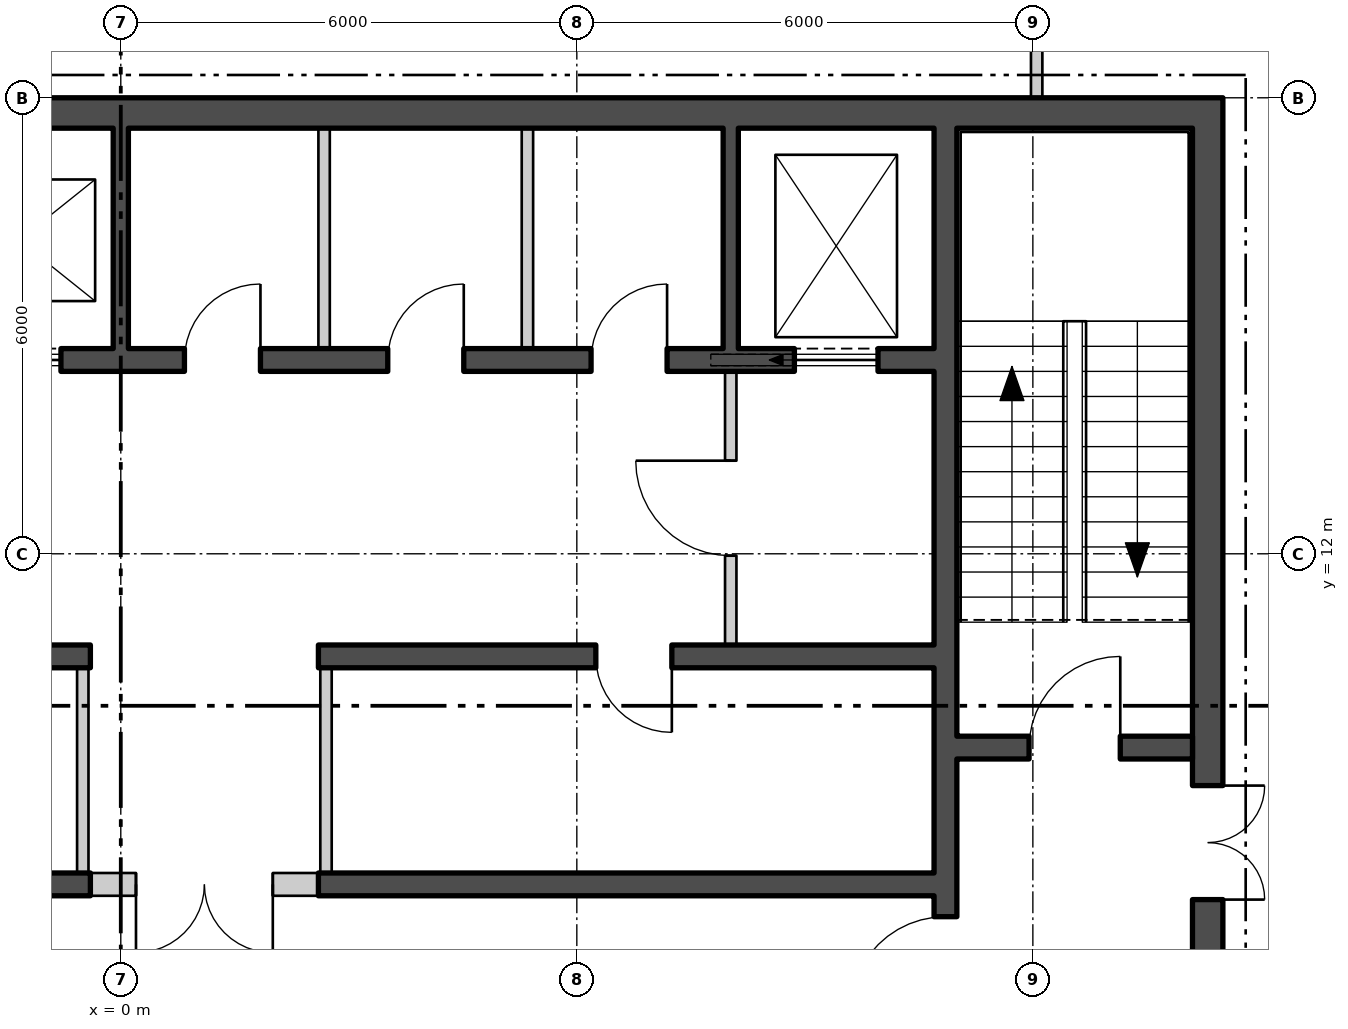
"""IFC4 building model, lengths in metres.
Left out: names, types, materials, properties, quantities, classifications, styles, units other than length and angle.
Written with IfcOpenShell. Run it as: python <this file> out.ifc"""

import sys

from ifc_helpers import new_model, si_unit, direction, frame, frame_2d, origin, place, context, subcontext, project, spatial, polyline, rectangle, outline, extrude, element, fill, save


model = new_model("IFC4")
c1 = context("Model", 3, precision=1e-05, world=origin(), true_north=direction((0.0, 1.0)))
c2 = subcontext(c1, "Body", "Model", "MODEL_VIEW")
j1 = project(units=[si_unit("LENGTHUNIT", "METRE"), si_unit("PLANEANGLEUNIT", "RADIAN")], contexts=[c1])
p1 = place(None, origin())
s1 = spatial("IfcSite", under=j1, at=p1, CompositionType="ELEMENT")
p2 = place(p1, origin())
s2 = spatial("IfcBuilding", under=s1, at=p2, CompositionType="ELEMENT")
p3 = place(p2, frame((0.0, 0.0, 280.5)))
s3 = spatial("IfcBuildingStorey", under=s2, at=p3, CompositionType="ELEMENT", Elevation=280.5)
p4 = place(p3, frame((2.515, -23.993, -0.18), z_axis=(0.0, 0.0, 1.0), x_axis=(0.500000711659, 0.866024992908, 0.0)))
e1 = element("IfcWall", 1, at=p4, inside=s3, PredefinedType="SOLIDWALL", context=c2, shape_type="SweptSolid", body=[
    extrude(outline(polyline([(-0.13, -0.225), (45.87, -0.225), (45.61, 0.225), (0.13, 0.225), (-0.13, -0.225)])), origin(), (0.0, 0.0, 1.0), 3.68),
])
p5 = place(p4, frame((1.424, 0.0, 1.08)))
e2 = element("IfcOpeningElement", 2, at=p5, cuts=e1, PredefinedType="OPENING", context=c2, shape_type="SweptSolid", body=[
    extrude(rectangle(XDim=2.4, YDim=2.0, at=frame_2d((1.2, 1.0))), frame((0.0, 0.235, 0.0), z_axis=(0.0, -1.0, 0.0), x_axis=(1.0, 0.0, 0.0)), (0.0, 0.0, 1.0), 0.47),
])
p6 = place(p4, frame((5.893, 0.0, 1.08)))
e3 = element("IfcOpeningElement", 3, at=p6, cuts=e1, PredefinedType="OPENING", context=c2, shape_type="SweptSolid", body=[
    extrude(rectangle(XDim=2.4, YDim=2.0, at=frame_2d((1.2, 1.0))), frame((0.0, 0.235, 0.0), z_axis=(0.0, -1.0, 0.0), x_axis=(1.0, 0.0, 0.0)), (0.0, 0.0, 1.0), 0.47),
])
p7 = place(p4, frame((10.401, 0.0, 1.08)))
e4 = element("IfcOpeningElement", 4, at=p7, cuts=e1, PredefinedType="OPENING", context=c2, shape_type="SweptSolid", body=[
    extrude(rectangle(XDim=2.4, YDim=2.0, at=frame_2d((1.2, 1.0))), frame((0.0, 0.235, 0.0), z_axis=(0.0, -1.0, 0.0), x_axis=(1.0, 0.0, 0.0)), (0.0, 0.0, 1.0), 0.47),
])
p8 = place(p4, frame((14.909, 0.0, 1.08)))
e5 = element("IfcOpeningElement", 5, at=p8, cuts=e1, PredefinedType="OPENING", context=c2, shape_type="SweptSolid", body=[
    extrude(rectangle(XDim=2.4, YDim=2.0, at=frame_2d((1.2, 1.0))), frame((0.0, 0.235, 0.0), z_axis=(0.0, -1.0, 0.0), x_axis=(1.0, 0.0, 0.0)), (0.0, 0.0, 1.0), 0.47),
])
p9 = place(p4, frame((19.416, 0.0, 1.08)))
e6 = element("IfcOpeningElement", 6, at=p9, cuts=e1, PredefinedType="OPENING", context=c2, shape_type="SweptSolid", body=[
    extrude(rectangle(XDim=2.4, YDim=2.0, at=frame_2d((1.2, 1.0))), frame((0.0, 0.235, 0.0), z_axis=(0.0, -1.0, 0.0), x_axis=(1.0, 0.0, 0.0)), (0.0, 0.0, 1.0), 0.47),
])
p10 = place(p4, frame((28.431, 0.0, 1.08)))
e7 = element("IfcOpeningElement", 7, at=p10, cuts=e1, PredefinedType="OPENING", context=c2, shape_type="SweptSolid", body=[
    extrude(rectangle(XDim=2.4, YDim=2.0, at=frame_2d((1.2, 1.0))), frame((0.0, 0.235, 0.0), z_axis=(0.0, -1.0, 0.0), x_axis=(1.0, 0.0, 0.0)), (0.0, 0.0, 1.0), 0.47),
])
p11 = place(p4, frame((37.447, 0.0, 1.08)))
e8 = element("IfcOpeningElement", 8, at=p11, cuts=e1, PredefinedType="OPENING", context=c2, shape_type="SweptSolid", body=[
    extrude(rectangle(XDim=2.4, YDim=2.0, at=frame_2d((1.2, 1.0))), frame((0.0, 0.235, 0.0), z_axis=(0.0, -1.0, 0.0), x_axis=(1.0, 0.0, 0.0)), (0.0, 0.0, 1.0), 0.47),
])
p12 = place(p4, frame((41.916, 0.0, 1.08)))
e9 = element("IfcOpeningElement", 9, at=p12, cuts=e1, PredefinedType="OPENING", context=c2, shape_type="SweptSolid", body=[
    extrude(rectangle(XDim=2.4, YDim=2.0, at=frame_2d((1.2, 1.0))), frame((0.0, 0.235, 0.0), z_axis=(0.0, -1.0, 0.0), x_axis=(1.0, 0.0, 0.0)), (0.0, 0.0, 1.0), 0.47),
])
p13 = place(p3, frame((-14.5, 17.8, 0.0), z_axis=(0.0, 0.0, 1.0), x_axis=(1.0, 0.0, 0.0)))
e10 = element("IfcWall", 10, at=p13, inside=s3, PredefinedType="SHEAR", context=c2, shape_type="SweptSolid", body=[
    extrude(rectangle(XDim=29.0, YDim=0.4, at=frame_2d((14.5, 0.0))), origin(), (0.0, 0.0, 1.0), 3.7),
])
p14 = place(p3, frame((14.3, 4.4, 0.0), z_axis=(0.0, 0.0, 1.0), x_axis=(0.0, 1.0, 0.0)))
e11 = element("IfcWall", 11, at=p14, inside=s3, PredefinedType="SHEAR", context=c2, shape_type="SweptSolid", body=[
    extrude(rectangle(XDim=13.2, YDim=0.4, at=frame_2d((6.6, 0.0))), origin(), (0.0, 0.0, 1.0), 3.7),
])
p15 = place(p14, frame((3.05, 0.0, 0.0)))
e12 = element("IfcOpeningElement", 12, at=p15, cuts=e11, PredefinedType="OPENING", context=c2, shape_type="SweptSolid", body=[
    extrude(rectangle(XDim=1.5, YDim=2.1, at=frame_2d((0.75, 1.05))), frame((0.0, 0.21, 0.0), z_axis=(0.0, -1.0, 0.0), x_axis=(1.0, 0.0, 0.0)), (0.0, 0.0, 1.0), 0.42),
])
p16 = place(p3, frame((10.85, 4.4, 0.0), z_axis=(0.0, 0.0, 1.0), x_axis=(0.0, 1.0, 0.0)))
e13 = element("IfcWall", 13, at=p16, inside=s3, PredefinedType="SHEAR", context=c2, shape_type="SweptSolid", body=[
    extrude(rectangle(XDim=13.2, YDim=0.3, at=frame_2d((6.6, 0.0))), origin(), (0.0, 0.0, 1.0), 3.7),
])
p17 = place(p16, frame((1.575, 0.0, 0.0)))
e14 = element("IfcOpeningElement", 14, at=p17, cuts=e13, PredefinedType="OPENING", context=c2, shape_type="SweptSolid", body=[
    extrude(rectangle(XDim=1.25, YDim=2.1, at=frame_2d((0.625, 1.05))), frame((0.0, 0.16, 0.0), z_axis=(0.0, -1.0, 0.0), x_axis=(1.0, 0.0, 0.0)), (0.0, 0.0, 1.0), 0.32),
])
p18 = place(p16, frame((0.4, 0.0, 0.0)))
e15 = element("IfcOpeningElement", 15, at=p18, cuts=e13, PredefinedType="OPENING", context=c2, shape_type="SweptSolid", body=[
    extrude(rectangle(XDim=0.9, YDim=2.1, at=frame_2d((0.45, 1.05))), frame((0.0, 0.16, 0.0), z_axis=(0.0, -1.0, 0.0), x_axis=(1.0, 0.0, 0.0)), (0.0, 0.0, 1.0), 0.32),
])
p19 = place(p3, frame((11.0, 9.45, 0.0), z_axis=(0.0, 0.0, 1.0), x_axis=(1.0, 0.0, 0.0)))
e16 = element("IfcWall", 16, at=p19, inside=s3, PredefinedType="SHEAR", context=c2, shape_type="SweptSolid", body=[
    extrude(rectangle(XDim=3.1, YDim=0.3, at=frame_2d((1.55, 0.0))), origin(), (0.0, 0.0, 1.0), 3.7),
])
p20 = place(p19, frame((0.95, 0.0, 0.0)))
e17 = element("IfcOpeningElement", 17, at=p20, cuts=e16, PredefinedType="OPENING", context=c2, shape_type="SweptSolid", body=[
    extrude(rectangle(XDim=1.2, YDim=2.1, at=frame_2d((0.6, 1.05))), frame((0.0, 0.16, 0.0), z_axis=(0.0, -1.0, 0.0), x_axis=(1.0, 0.0, 0.0)), (0.0, 0.0, 1.0), 0.32),
])
p21 = place(p3, frame((-10.7, 14.55, 0.0), z_axis=(0.0, 0.0, 1.0), x_axis=(1.0, 0.0, 0.0)))
e18 = element("IfcWall", 18, at=p21, inside=s3, PredefinedType="SHEAR", context=c2, shape_type="SweptSolid", body=[
    extrude(rectangle(XDim=21.4, YDim=0.3, at=frame_2d((10.7, 0.0))), origin(), (0.0, 0.0, 1.0), 3.7),
])
p22 = place(p21, frame((0.738, 0.0, 0.0)))
e19 = element("IfcOpeningElement", 19, at=p22, cuts=e18, PredefinedType="OPENING", context=c2, shape_type="SweptSolid", body=[
    extrude(rectangle(XDim=1.1, YDim=2.1, at=frame_2d((0.55, 1.05))), frame((0.0, 0.16, 0.0), z_axis=(0.0, -1.0, 0.0), x_axis=(1.0, 0.0, 0.0)), (0.0, 0.0, 1.0), 0.32),
])
p23 = place(p21, frame((3.462, 0.0, 0.0)))
e20 = element("IfcOpeningElement", 20, at=p23, cuts=e18, PredefinedType="OPENING", context=c2, shape_type="SweptSolid", body=[
    extrude(rectangle(XDim=1.1, YDim=2.1, at=frame_2d((0.55, 1.05))), frame((0.0, 0.16, 0.0), z_axis=(0.0, -1.0, 0.0), x_axis=(1.0, 0.0, 0.0)), (0.0, 0.0, 1.0), 0.32),
])
p24 = place(p21, frame((6.138, 0.0, 0.0)))
e21 = element("IfcOpeningElement", 21, at=p24, cuts=e18, PredefinedType="OPENING", context=c2, shape_type="SweptSolid", body=[
    extrude(rectangle(XDim=1.1, YDim=2.1, at=frame_2d((0.55, 1.05))), frame((0.0, 0.16, 0.0), z_axis=(0.0, -1.0, 0.0), x_axis=(1.0, 0.0, 0.0)), (0.0, 0.0, 1.0), 0.32),
])
p25 = place(p21, frame((8.812, 0.0, 0.0)))
e22 = element("IfcOpeningElement", 22, at=p25, cuts=e18, PredefinedType="OPENING", context=c2, shape_type="SweptSolid", body=[
    extrude(rectangle(XDim=1.1, YDim=2.1, at=frame_2d((0.55, 1.05))), frame((0.0, 0.16, 0.0), z_axis=(0.0, -1.0, 0.0), x_axis=(1.0, 0.0, 0.0)), (0.0, 0.0, 1.0), 0.32),
])
p26 = place(p21, frame((19.562, 0.0, 0.0)))
e23 = element("IfcOpeningElement", 23, at=p26, cuts=e18, PredefinedType="OPENING", context=c2, shape_type="SweptSolid", body=[
    extrude(rectangle(XDim=1.1, YDim=2.1, at=frame_2d((0.55, 1.05))), frame((0.0, 0.16, 0.0), z_axis=(0.0, -1.0, 0.0), x_axis=(1.0, 0.0, 0.0)), (0.0, 0.0, 1.0), 0.32),
])
p27 = place(p21, frame((11.537, 0.0, 0.0)))
e24 = element("IfcOpeningElement", 24, at=p27, cuts=e18, PredefinedType="OPENING", context=c2, shape_type="SweptSolid", body=[
    extrude(rectangle(XDim=1.0, YDim=2.1, at=frame_2d((0.5, 1.05))), frame((0.0, 0.16, 0.0), z_axis=(0.0, -1.0, 0.0), x_axis=(1.0, 0.0, 0.0)), (0.0, 0.0, 1.0), 0.32),
])
p28 = place(p21, frame((14.213, 0.0, 0.0)))
e25 = element("IfcOpeningElement", 25, at=p28, cuts=e18, PredefinedType="OPENING", context=c2, shape_type="SweptSolid", body=[
    extrude(rectangle(XDim=1.0, YDim=2.1, at=frame_2d((0.5, 1.05))), frame((0.0, 0.16, 0.0), z_axis=(0.0, -1.0, 0.0), x_axis=(1.0, 0.0, 0.0)), (0.0, 0.0, 1.0), 0.32),
])
p29 = place(p21, frame((16.887, 0.0, 0.0)))
e26 = element("IfcOpeningElement", 26, at=p29, cuts=e18, PredefinedType="OPENING", context=c2, shape_type="SweptSolid", body=[
    extrude(rectangle(XDim=1.0, YDim=2.1, at=frame_2d((0.5, 1.05))), frame((0.0, 0.16, 0.0), z_axis=(0.0, -1.0, 0.0), x_axis=(1.0, 0.0, 0.0)), (0.0, 0.0, 1.0), 0.32),
])
p30 = place(p3, frame((-10.7, 10.65, 0.0), z_axis=(0.0, 0.0, 1.0), x_axis=(1.0, 0.0, 0.0)))
e27 = element("IfcWall", 27, at=p30, inside=s3, PredefinedType="SHEAR", context=c2, shape_type="SweptSolid", body=[
    extrude(rectangle(XDim=10.3, YDim=0.3, at=frame_2d((5.15, 0.0))), origin(), (0.0, 0.0, 1.0), 3.7),
])
p31 = place(p30, frame((0.675, 0.0, 0.0)))
e28 = element("IfcOpeningElement", 28, at=p31, cuts=e27, PredefinedType="OPENING", context=c2, shape_type="SweptSolid", body=[
    extrude(rectangle(XDim=1.1, YDim=2.1, at=frame_2d((0.55, 1.05))), frame((0.0, 0.16, 0.0), z_axis=(0.0, -1.0, 0.0), x_axis=(1.0, 0.0, 0.0)), (0.0, 0.0, 1.0), 0.32),
])
p32 = place(p30, frame((3.275, 0.0, 0.0)))
e29 = element("IfcOpeningElement", 29, at=p32, cuts=e27, PredefinedType="OPENING", context=c2, shape_type="SweptSolid", body=[
    extrude(rectangle(XDim=1.1, YDim=2.1, at=frame_2d((0.55, 1.05))), frame((0.0, 0.16, 0.0), z_axis=(0.0, -1.0, 0.0), x_axis=(1.0, 0.0, 0.0)), (0.0, 0.0, 1.0), 0.32),
])
p33 = place(p30, frame((5.825, 0.0, 0.0)))
e30 = element("IfcOpeningElement", 30, at=p33, cuts=e27, PredefinedType="OPENING", context=c2, shape_type="SweptSolid", body=[
    extrude(rectangle(XDim=1.1, YDim=2.1, at=frame_2d((0.55, 1.05))), frame((0.0, 0.16, 0.0), z_axis=(0.0, -1.0, 0.0), x_axis=(1.0, 0.0, 0.0)), (0.0, 0.0, 1.0), 0.32),
])
p34 = place(p30, frame((8.425, 0.0, 0.0)))
e31 = element("IfcOpeningElement", 31, at=p34, cuts=e27, PredefinedType="OPENING", context=c2, shape_type="SweptSolid", body=[
    extrude(rectangle(XDim=1.0, YDim=2.1, at=frame_2d((0.5, 1.05))), frame((0.0, 0.16, 0.0), z_axis=(0.0, -1.0, 0.0), x_axis=(1.0, 0.0, 0.0)), (0.0, 0.0, 1.0), 0.32),
])
p35 = place(p3, frame((-10.7, 7.65, 0.0), z_axis=(0.0, 0.0, 1.0), x_axis=(1.0, 0.0, 0.0)))
e32 = element("IfcWall", 32, at=p35, inside=s3, PredefinedType="SHEAR", context=c2, shape_type="SweptSolid", body=[
    extrude(rectangle(XDim=10.3, YDim=0.3, at=frame_2d((5.15, 0.0))), origin(), (0.0, 0.0, 1.0), 3.7),
])
p36 = place(p3, frame((2.6, 10.65, 0.0), z_axis=(0.0, 0.0, 1.0), x_axis=(1.0, 0.0, 0.0)))
e33 = element("IfcWall", 33, at=p36, inside=s3, PredefinedType="SHEAR", context=c2, shape_type="SweptSolid", body=[
    extrude(rectangle(XDim=8.1, YDim=0.3, at=frame_2d((4.05, 0.0))), origin(), (0.0, 0.0, 1.0), 3.7),
])
p37 = place(p36, frame((3.65, 0.0, 0.0)))
e34 = element("IfcOpeningElement", 34, at=p37, cuts=e33, PredefinedType="OPENING", context=c2, shape_type="SweptSolid", body=[
    extrude(rectangle(XDim=1.0, YDim=2.1, at=frame_2d((0.5, 1.05))), frame((0.0, 0.16, 0.0), z_axis=(0.0, -1.0, 0.0), x_axis=(1.0, 0.0, 0.0)), (0.0, 0.0, 1.0), 0.32),
])
p38 = place(p3, frame((2.6, 7.65, 0.0), z_axis=(0.0, 0.0, 1.0), x_axis=(1.0, 0.0, 0.0)))
e35 = element("IfcWall", 35, at=p38, inside=s3, PredefinedType="SHEAR", context=c2, shape_type="SweptSolid", body=[
    extrude(rectangle(XDim=8.1, YDim=0.3, at=frame_2d((4.05, 0.0))), origin(), (0.0, 0.0, 1.0), 3.7),
])
p39 = place(p3, frame((0.0, 14.7, 0.0), z_axis=(0.0, 0.0, 1.0), x_axis=(0.0, 1.0, 0.0)))
e36 = element("IfcWall", 36, at=p39, inside=s3, PredefinedType="SHEAR", context=c2, shape_type="SweptSolid", body=[
    extrude(rectangle(XDim=2.9, YDim=0.2, at=frame_2d((1.45, 0.0))), origin(), (0.0, 0.0, 1.0), 3.7),
])
for number, where, z_axis, x_axis in (
    (37, (2.675, 14.7, 0.0), (0.0, 0.0, 1.0), (0.0, 1.0, 0.0)),
    (38, (5.35, 14.7, 0.0), (0.0, 0.0, 1.0), (0.0, 1.0, 0.0)),
):
    element("IfcWall", number, at=place(p3, frame(where, z_axis=z_axis, x_axis=x_axis)), inside=s3, PredefinedType="PARTITIONING", context=c2, shape_type="SweptSolid", body=[
        extrude(rectangle(XDim=2.9, YDim=0.15, at=frame_2d((1.45, 0.0))), origin(), (0.0, 0.0, 1.0), 3.7),
    ])
p40 = place(p3, frame((8.025, 14.7, 0.0), z_axis=(0.0, 0.0, 1.0), x_axis=(0.0, 1.0, 0.0)))
e39 = element("IfcWall", 39, at=p40, inside=s3, PredefinedType="SHEAR", context=c2, shape_type="SweptSolid", body=[
    extrude(rectangle(XDim=2.9, YDim=0.2, at=frame_2d((1.45, 0.0))), origin(), (0.0, 0.0, 1.0), 3.7),
])
for number, where, z_axis, x_axis in (
    (40, (-0.5, 7.8, 0.0), (0.0, 0.0, 1.0), (0.0, 1.0, 0.0)),
    (41, (2.7, 7.8, 0.0), (0.0, 0.0, 1.0), (0.0, 1.0, 0.0)),
):
    element("IfcWall", number, at=place(p3, frame(where, z_axis=z_axis, x_axis=x_axis)), inside=s3, PredefinedType="PARTITIONING", context=c2, shape_type="SweptSolid", body=[
        extrude(rectangle(XDim=2.7, YDim=0.15, at=frame_2d((1.35, 0.0))), origin(), (0.0, 0.0, 1.0), 3.7),
    ])
p41 = place(p3, frame((8.025, 10.8, 0.0), z_axis=(0.0, 0.0, 1.0), x_axis=(0.0, 1.0, 0.0)))
e42 = element("IfcWall", 42, at=p41, inside=s3, PredefinedType="PARTITIONING", context=c2, shape_type="SweptSolid", body=[
    extrude(rectangle(XDim=3.6, YDim=0.15, at=frame_2d((1.8, 0.0))), origin(), (0.0, 0.0, 1.0), 3.7),
])
p42 = place(p41, frame((1.175, 0.0, 0.0)))
e43 = element("IfcOpeningElement", 43, at=p42, cuts=e42, PredefinedType="OPENING", context=c2, shape_type="SweptSolid", body=[
    extrude(rectangle(XDim=1.25, YDim=2.1, at=frame_2d((0.625, 1.05))), frame((0.0, 0.085, 0.0), z_axis=(0.0, -1.0, 0.0), x_axis=(1.0, 0.0, 0.0)), (0.0, 0.0, 1.0), 0.17),
])
p43 = place(p3, frame((-0.4, 7.65, 0.0), z_axis=(0.0, 0.0, 1.0), x_axis=(1.0, 0.0, 0.0)))
e44 = element("IfcWall", 44, at=p43, inside=s3, PredefinedType="PARTITIONING", context=c2, shape_type="SweptSolid", body=[
    extrude(rectangle(XDim=3.0, YDim=0.3, at=frame_2d((1.5, 0.0))), origin(), (0.0, 0.0, 1.0), 3.7),
])
p44 = place(p43, frame((0.6, 0.0, 0.0)))
e45 = element("IfcOpeningElement", 45, at=p44, cuts=e44, PredefinedType="OPENING", context=c2, shape_type="SweptSolid", body=[
    extrude(rectangle(XDim=1.8, YDim=2.4, at=frame_2d((0.9, 1.2))), frame((0.0, 0.16, 0.0), z_axis=(0.0, -1.0, 0.0), x_axis=(1.0, 0.0, 0.0)), (0.0, 0.0, 1.0), 0.32),
])
p45 = place(p3, frame((12.05, 18.0, 0.0), z_axis=(0.0, 0.0, 1.0), x_axis=(0.0, 1.0, 0.0)))
e46 = element("IfcWall", 46, at=p45, inside=s3, PredefinedType="PARTITIONING", context=c2, shape_type="SweptSolid", body=[
    extrude(rectangle(XDim=1.75, YDim=0.15, at=frame_2d((0.875, 0.0))), origin(), (0.0, 0.0, 1.0), 3.7),
])
p46 = place(p25, origin())
e47 = element("IfcDoor", 47, at=p46, inside=s3, OperationType="SLIDING_TO_LEFT", PredefinedType="DOOR", context=c2, shape_type="SweptSolid", body=[
    extrude(rectangle(XDim=1.1, YDim=2.1, at=frame_2d((0.55, 1.05))), frame((0.0, 0.025, 0.0), z_axis=(0.0, -1.0, 0.0), x_axis=(1.0, 0.0, 0.0)), (0.0, 0.0, 1.0), 0.05),
])
fill(e22, e47)
p47 = place(p26, origin())
e48 = element("IfcDoor", 48, at=p47, inside=s3, OperationType="SLIDING_TO_LEFT", PredefinedType="DOOR", context=c2, shape_type="SweptSolid", body=[
    extrude(rectangle(XDim=1.1, YDim=2.1, at=frame_2d((0.55, 1.05))), frame((0.0, 0.025, 0.0), z_axis=(0.0, -1.0, 0.0), x_axis=(1.0, 0.0, 0.0)), (0.0, 0.0, 1.0), 0.05),
])
fill(e23, e48)
p48 = place(p27, origin())
e49 = element("IfcDoor", 49, at=p48, inside=s3, OperationType="SINGLE_SWING_LEFT", PredefinedType="DOOR", context=c2, shape_type="SweptSolid", body=[
    extrude(rectangle(XDim=1.0, YDim=2.1, at=frame_2d((0.5, 1.05))), frame((0.0, 0.025, 0.0), z_axis=(0.0, -1.0, 0.0), x_axis=(1.0, 0.0, 0.0)), (0.0, 0.0, 1.0), 0.05),
])
fill(e24, e49)
p49 = place(p28, origin())
e50 = element("IfcDoor", 50, at=p49, inside=s3, OperationType="SINGLE_SWING_LEFT", PredefinedType="DOOR", context=c2, shape_type="SweptSolid", body=[
    extrude(rectangle(XDim=1.0, YDim=2.1, at=frame_2d((0.5, 1.05))), frame((0.0, 0.025, 0.0), z_axis=(0.0, -1.0, 0.0), x_axis=(1.0, 0.0, 0.0)), (0.0, 0.0, 1.0), 0.05),
])
fill(e25, e50)
p50 = place(p29, origin())
e51 = element("IfcDoor", 51, at=p50, inside=s3, OperationType="SINGLE_SWING_LEFT", PredefinedType="DOOR", context=c2, shape_type="SweptSolid", body=[
    extrude(rectangle(XDim=1.0, YDim=2.1, at=frame_2d((0.5, 1.05))), frame((0.0, 0.025, 0.0), z_axis=(0.0, -1.0, 0.0), x_axis=(1.0, 0.0, 0.0)), (0.0, 0.0, 1.0), 0.05),
])
fill(e26, e51)
p51 = place(p37, origin())
e52 = element("IfcDoor", 52, at=p51, inside=s3, OperationType="SINGLE_SWING_RIGHT", PredefinedType="DOOR", context=c2, shape_type="SweptSolid", body=[
    extrude(rectangle(XDim=1.0, YDim=2.1, at=frame_2d((0.5, 1.05))), frame((0.0, 0.025, 0.0), z_axis=(0.0, -1.0, 0.0), x_axis=(1.0, 0.0, 0.0)), (0.0, 0.0, 1.0), 0.05),
])
fill(e34, e52)
p52 = place(p42, origin())
e53 = element("IfcDoor", 53, at=p52, inside=s3, OperationType="SINGLE_SWING_LEFT", PredefinedType="DOOR", context=c2, shape_type="SweptSolid", body=[
    extrude(rectangle(XDim=1.25, YDim=2.1, at=frame_2d((0.625, 1.05))), frame((0.0, 0.025, 0.0), z_axis=(0.0, -1.0, 0.0), x_axis=(1.0, 0.0, 0.0)), (0.0, 0.0, 1.0), 0.05),
])
fill(e43, e53)
p53 = place(p20, origin())
e54 = element("IfcDoor", 54, at=p53, inside=s3, OperationType="SINGLE_SWING_LEFT", PredefinedType="DOOR", context=c2, shape_type="SweptSolid", body=[
    extrude(rectangle(XDim=1.2, YDim=2.1, at=frame_2d((0.6, 1.05))), frame((0.0, 0.025, 0.0), z_axis=(0.0, -1.0, 0.0), x_axis=(1.0, 0.0, 0.0)), (0.0, 0.0, 1.0), 0.05),
])
fill(e17, e54)
p54 = place(p17, origin())
e55 = element("IfcDoor", 55, at=p54, inside=s3, OperationType="SINGLE_SWING_RIGHT", PredefinedType="DOOR", context=c2, shape_type="SweptSolid", body=[
    extrude(rectangle(XDim=1.25, YDim=2.1, at=frame_2d((0.625, 1.05))), frame((0.0, 0.025, 0.0), z_axis=(0.0, -1.0, 0.0), x_axis=(1.0, 0.0, 0.0)), (0.0, 0.0, 1.0), 0.05),
])
fill(e14, e55)
p55 = place(p15, origin())
e56 = element("IfcDoor", 56, at=p55, inside=s3, OperationType="DOUBLE_DOOR_SINGLE_SWING", PredefinedType="DOOR", context=c2, shape_type="SweptSolid", body=[
    extrude(rectangle(XDim=1.5, YDim=2.1, at=frame_2d((0.75, 1.05))), frame((0.0, 0.025, 0.0), z_axis=(0.0, -1.0, 0.0), x_axis=(1.0, 0.0, 0.0)), (0.0, 0.0, 1.0), 0.05),
])
fill(e12, e56)
p56 = place(p44, origin())
e57 = element("IfcDoor", 57, at=p56, inside=s3, OperationType="DOUBLE_DOOR_SINGLE_SWING", PredefinedType="DOOR", context=c2, shape_type="SweptSolid", body=[
    extrude(rectangle(XDim=1.8, YDim=2.4, at=frame_2d((0.9, 1.2))), frame((0.0, 0.025, 0.0), z_axis=(0.0, -1.0, 0.0), x_axis=(1.0, 0.0, 0.0)), (0.0, 0.0, 1.0), 0.05),
])
fill(e45, e57)
save(model, sys.argv[1])
